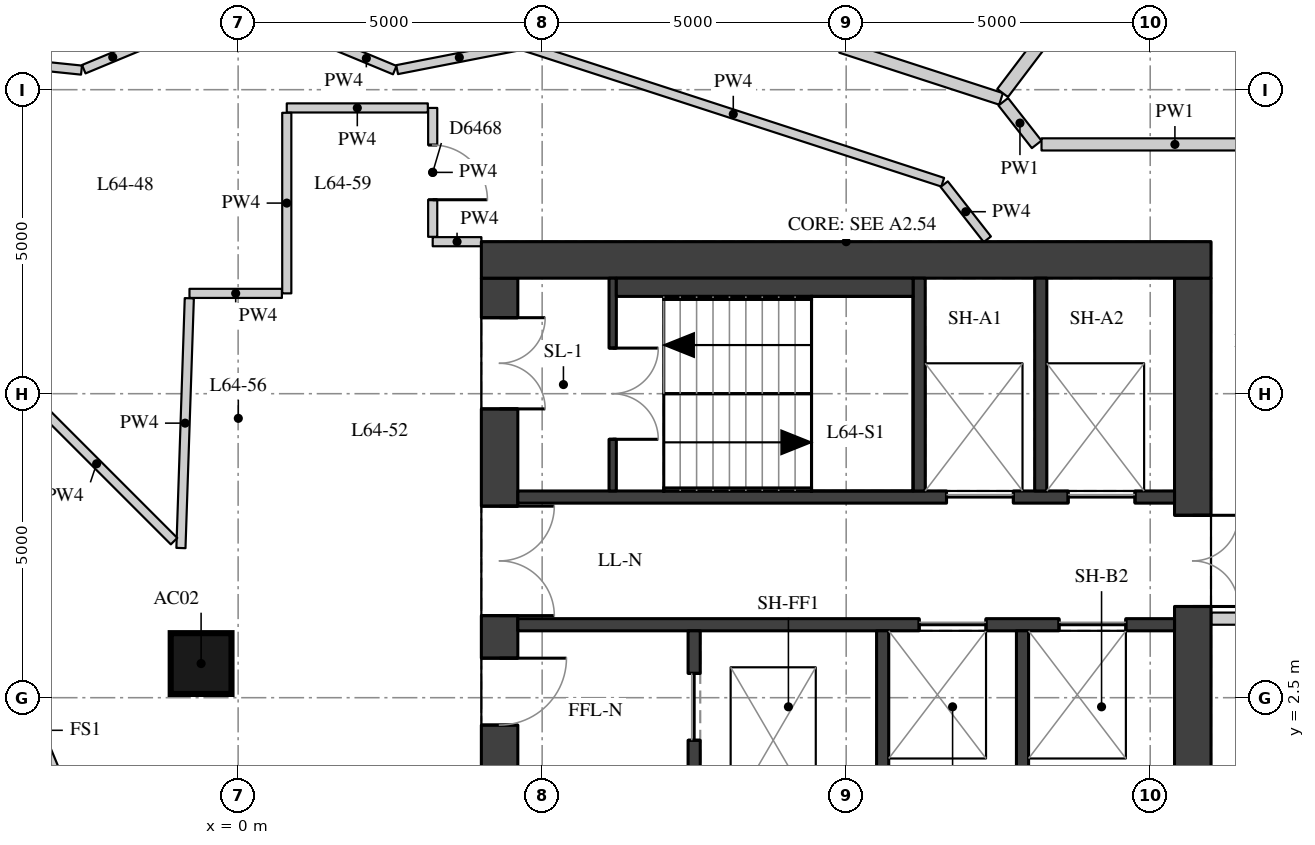
"""IFC4 building model, lengths in metres.
Left out: names, types, materials, properties, quantities, classifications, styles, units other than length and angle.
Written with IfcOpenShell. Run it as: python <this file> out.ifc"""

import sys

from ifc_helpers import new_model, si_unit, direction, frame, frame_2d, origin, origin_2d, place, context, subcontext, project, spatial, rectangle, extrude, element, fill, save


model = new_model("IFC4")
c1 = context("Model", 3, precision=1e-05, world=origin(), true_north=direction((0.0, 1.0)))
c2 = subcontext(c1, "Body", "Model", "MODEL_VIEW")
j1 = project(units=[si_unit("LENGTHUNIT", "METRE"), si_unit("PLANEANGLEUNIT", "RADIAN")], contexts=[c1])
p1 = place(None, origin())
s1 = spatial("IfcSite", under=j1, at=p1, CompositionType="ELEMENT")
p2 = place(p1, origin())
s2 = spatial("IfcBuilding", under=s1, at=p2, CompositionType="ELEMENT")
p3 = place(p2, frame((0.0, 0.0, 225.5)))
s3 = spatial("IfcBuildingStorey", under=s2, at=p3, CompositionType="ELEMENT", Elevation=225.5)
p4 = place(p3, frame((-0.609, 3.062, 0.0), z_axis=(0.0, 0.0, 1.0), x_axis=(1.0, 0.0, 0.0)))
e1 = element("IfcColumn", 1, at=p4, inside=s3, PredefinedType="COLUMN", context=c2, shape_type="SweptSolid", body=[
    extrude(rectangle(XDim=1.0, YDim=1.0, at=origin_2d()), origin(), (0.0, 0.0, 1.0), 3.3),
])
p5 = place(p3, frame((4.3, -9.4, 0.0), z_axis=(0.0, 0.0, 1.0), x_axis=(0.0, 1.0, 0.0)))
e2 = element("IfcWall", 2, at=p5, inside=s3, PredefinedType="SHEAR", context=c2, shape_type="SweptSolid", body=[
    extrude(rectangle(XDim=18.8, YDim=0.6, at=frame_2d((9.4, 0.0))), origin(), (0.0, 0.0, 1.0), 2.85),
])
p6 = place(p5, frame((0.65, 0.0, 0.0)))
e3 = element("IfcOpeningElement", 3, at=p6, cuts=e2, PredefinedType="OPENING", context=c2, shape_type="SweptSolid", body=[
    extrude(rectangle(XDim=1.5, YDim=2.1, at=frame_2d((0.75, 1.05))), frame((0.0, 0.31, 0.0), z_axis=(0.0, -1.0, 0.0), x_axis=(1.0, 0.0, 0.0)), (0.0, 0.0, 1.0), 0.62),
])
p7 = place(p5, frame((3.75, 0.0, 0.0)))
e4 = element("IfcOpeningElement", 4, at=p7, cuts=e2, PredefinedType="OPENING", context=c2, shape_type="SweptSolid", body=[
    extrude(rectangle(XDim=1.8, YDim=2.1, at=frame_2d((0.9, 1.05))), frame((0.0, 0.31, 0.0), z_axis=(0.0, -1.0, 0.0), x_axis=(1.0, 0.0, 0.0)), (0.0, 0.0, 1.0), 0.62),
])
p8 = place(p5, frame((6.25, 0.0, 0.0)))
e5 = element("IfcOpeningElement", 5, at=p8, cuts=e2, PredefinedType="OPENING", context=c2, shape_type="SweptSolid", body=[
    extrude(rectangle(XDim=1.1, YDim=2.1, at=frame_2d((0.55, 1.05))), frame((0.0, 0.31, 0.0), z_axis=(0.0, -1.0, 0.0), x_axis=(1.0, 0.0, 0.0)), (0.0, 0.0, 1.0), 0.62),
])
p9 = place(p5, frame((8.9, 0.0, 0.0)))
e6 = element("IfcOpeningElement", 6, at=p9, cuts=e2, PredefinedType="OPENING", context=c2, shape_type="SweptSolid", body=[
    extrude(rectangle(XDim=1.0, YDim=2.1, at=frame_2d((0.5, 1.05))), frame((0.0, 0.31, 0.0), z_axis=(0.0, -1.0, 0.0), x_axis=(1.0, 0.0, 0.0)), (0.0, 0.0, 1.0), 0.62),
])
p10 = place(p5, frame((11.45, 0.0, 0.0)))
e7 = element("IfcOpeningElement", 7, at=p10, cuts=e2, PredefinedType="OPENING", context=c2, shape_type="SweptSolid", body=[
    extrude(rectangle(XDim=1.1, YDim=2.1, at=frame_2d((0.55, 1.05))), frame((0.0, 0.31, 0.0), z_axis=(0.0, -1.0, 0.0), x_axis=(1.0, 0.0, 0.0)), (0.0, 0.0, 1.0), 0.62),
])
p11 = place(p5, frame((13.25, 0.0, 0.0)))
e8 = element("IfcOpeningElement", 8, at=p11, cuts=e2, PredefinedType="OPENING", context=c2, shape_type="SweptSolid", body=[
    extrude(rectangle(XDim=1.8, YDim=2.1, at=frame_2d((0.9, 1.05))), frame((0.0, 0.31, 0.0), z_axis=(0.0, -1.0, 0.0), x_axis=(1.0, 0.0, 0.0)), (0.0, 0.0, 1.0), 0.62),
])
p12 = place(p5, frame((16.65, 0.0, 0.0)))
e9 = element("IfcOpeningElement", 9, at=p12, cuts=e2, PredefinedType="OPENING", context=c2, shape_type="SweptSolid", body=[
    extrude(rectangle(XDim=1.5, YDim=2.1, at=frame_2d((0.75, 1.05))), frame((0.0, 0.31, 0.0), z_axis=(0.0, -1.0, 0.0), x_axis=(1.0, 0.0, 0.0)), (0.0, 0.0, 1.0), 0.62),
])
p13 = place(p3, frame((15.7, -9.4, 0.0), z_axis=(0.0, 0.0, 1.0), x_axis=(0.0, 1.0, 0.0)))
e10 = element("IfcWall", 10, at=p13, inside=s3, PredefinedType="SHEAR", context=c2, shape_type="SweptSolid", body=[
    extrude(rectangle(XDim=18.8, YDim=0.6, at=frame_2d((9.4, 0.0))), origin(), (0.0, 0.0, 1.0), 2.85),
])
p14 = place(p13, frame((13.4, 0.0, 0.0)))
e11 = element("IfcOpeningElement", 11, at=p14, cuts=e10, PredefinedType="OPENING", context=c2, shape_type="SweptSolid", body=[
    extrude(rectangle(XDim=1.5, YDim=2.1, at=frame_2d((0.75, 1.05))), frame((0.0, 0.31, 0.0), z_axis=(0.0, -1.0, 0.0), x_axis=(1.0, 0.0, 0.0)), (0.0, 0.0, 1.0), 0.62),
])
p15 = place(p13, frame((3.9, 0.0, 0.0)))
e12 = element("IfcOpeningElement", 12, at=p15, cuts=e10, PredefinedType="OPENING", context=c2, shape_type="SweptSolid", body=[
    extrude(rectangle(XDim=1.5, YDim=2.1, at=frame_2d((0.75, 1.05))), frame((0.0, 0.31, 0.0), z_axis=(0.0, -1.0, 0.0), x_axis=(1.0, 0.0, 0.0)), (0.0, 0.0, 1.0), 0.62),
])
p16 = place(p3, frame((4.0, 9.7, 0.0), z_axis=(0.0, 0.0, 1.0), x_axis=(1.0, 0.0, 0.0)))
e13 = element("IfcWall", 13, at=p16, inside=s3, PredefinedType="SHEAR", context=c2, shape_type="SweptSolid", body=[
    extrude(rectangle(XDim=12.0, YDim=0.6, at=frame_2d((6.0, 0.0))), origin(), (0.0, 0.0, 1.0), 2.85),
])
p17 = place(p3, frame((4.6, 5.8, 0.0), z_axis=(0.0, 0.0, 1.0), x_axis=(1.0, 0.0, 0.0)))
e14 = element("IfcWall", 14, at=p17, inside=s3, PredefinedType="SHEAR", context=c2, shape_type="SweptSolid", body=[
    extrude(rectangle(XDim=10.8, YDim=0.2, at=frame_2d((5.4, 0.0))), origin(), (0.0, 0.0, 1.0), 2.85),
])
p18 = place(p17, frame((7.05, 0.0, 0.0)))
e15 = element("IfcOpeningElement", 15, at=p18, cuts=e14, PredefinedType="OPENING", context=c2, shape_type="SweptSolid", body=[
    extrude(rectangle(XDim=1.1, YDim=2.1, at=frame_2d((0.55, 1.05))), frame((0.0, 0.11, 0.0), z_axis=(0.0, -1.0, 0.0), x_axis=(1.0, 0.0, 0.0)), (0.0, 0.0, 1.0), 0.22),
])
p19 = place(p17, frame((9.05, 0.0, 0.0)))
e16 = element("IfcOpeningElement", 16, at=p19, cuts=e14, PredefinedType="OPENING", context=c2, shape_type="SweptSolid", body=[
    extrude(rectangle(XDim=1.1, YDim=2.1, at=frame_2d((0.55, 1.05))), frame((0.0, 0.11, 0.0), z_axis=(0.0, -1.0, 0.0), x_axis=(1.0, 0.0, 0.0)), (0.0, 0.0, 1.0), 0.22),
])
p20 = place(p3, frame((4.6, 3.7, 0.0), z_axis=(0.0, 0.0, 1.0), x_axis=(1.0, 0.0, 0.0)))
e17 = element("IfcWall", 17, at=p20, inside=s3, PredefinedType="SHEAR", context=c2, shape_type="SweptSolid", body=[
    extrude(rectangle(XDim=10.8, YDim=0.2, at=frame_2d((5.4, 0.0))), origin(), (0.0, 0.0, 1.0), 2.85),
])
p21 = place(p20, frame((6.6, 0.0, 0.0)))
e18 = element("IfcOpeningElement", 18, at=p21, cuts=e17, PredefinedType="OPENING", context=c2, shape_type="SweptSolid", body=[
    extrude(rectangle(XDim=1.1, YDim=2.1, at=frame_2d((0.55, 1.05))), frame((0.0, 0.11, 0.0), z_axis=(0.0, -1.0, 0.0), x_axis=(1.0, 0.0, 0.0)), (0.0, 0.0, 1.0), 0.22),
])
p22 = place(p20, frame((8.9, 0.0, 0.0)))
e19 = element("IfcOpeningElement", 19, at=p22, cuts=e17, PredefinedType="OPENING", context=c2, shape_type="SweptSolid", body=[
    extrude(rectangle(XDim=1.1, YDim=2.1, at=frame_2d((0.55, 1.05))), frame((0.0, 0.11, 0.0), z_axis=(0.0, -1.0, 0.0), x_axis=(1.0, 0.0, 0.0)), (0.0, 0.0, 1.0), 0.22),
])
for number, where, z_axis, x_axis in (
    (20, (11.2, 5.9, 0.0), (0.0, 0.0, 1.0), (0.0, 1.0, 0.0)),
    (21, (13.2, 5.9, 0.0), (0.0, 0.0, 1.0), (0.0, 1.0, 0.0)),
):
    element("IfcWall", number, at=place(p3, frame(where, z_axis=z_axis, x_axis=x_axis)), inside=s3, PredefinedType="SHEAR", context=c2, shape_type="SweptSolid", body=[
        extrude(rectangle(XDim=3.5, YDim=0.2, at=frame_2d((1.75, 0.0))), origin(), (0.0, 0.0, 1.0), 2.85),
    ])
p23 = place(p3, frame((7.5, 1.1, 0.0), z_axis=(0.0, 0.0, 1.0), x_axis=(0.0, 1.0, 0.0)))
e22 = element("IfcWall", 22, at=p23, inside=s3, PredefinedType="SHEAR", context=c2, shape_type="SweptSolid", body=[
    extrude(rectangle(XDim=2.5, YDim=0.2, at=frame_2d((1.25, 0.0))), origin(), (0.0, 0.0, 1.0), 2.85),
])
p24 = place(p23, frame((0.7, 0.0, 0.0)))
e23 = element("IfcOpeningElement", 23, at=p24, cuts=e22, PredefinedType="OPENING", context=c2, shape_type="SweptSolid", body=[
    extrude(rectangle(XDim=1.1, YDim=2.1, at=frame_2d((0.55, 1.05))), frame((0.0, 0.11, 0.0), z_axis=(0.0, -1.0, 0.0), x_axis=(1.0, 0.0, 0.0)), (0.0, 0.0, 1.0), 0.22),
])
for number, where, z_axis, x_axis in (
    (24, (10.6, 1.1, 0.0), (0.0, 0.0, 1.0), (0.0, 1.0, 0.0)),
    (25, (12.9, 1.1, 0.0), (0.0, 0.0, 1.0), (0.0, 1.0, 0.0)),
):
    element("IfcWall", number, at=place(p3, frame(where, z_axis=z_axis, x_axis=x_axis)), inside=s3, PredefinedType="SHEAR", context=c2, shape_type="SweptSolid", body=[
        extrude(rectangle(XDim=2.5, YDim=0.2, at=frame_2d((1.25, 0.0))), origin(), (0.0, 0.0, 1.0), 2.85),
    ])
p25 = place(p3, frame((6.16, 5.9, 0.0), z_axis=(0.0, 0.0, 1.0), x_axis=(0.0, 1.0, 0.0)))
e26 = element("IfcWall", 26, at=p25, inside=s3, PredefinedType="SHEAR", context=c2, shape_type="SweptSolid", body=[
    extrude(rectangle(XDim=3.5, YDim=0.12, at=frame_2d((1.75, 0.0))), origin(), (0.0, 0.0, 1.0), 2.85),
])
p26 = place(p25, frame((0.85, 0.0, 0.0)))
e27 = element("IfcOpeningElement", 27, at=p26, cuts=e26, PredefinedType="OPENING", context=c2, shape_type="SweptSolid", body=[
    extrude(rectangle(XDim=1.5, YDim=2.1, at=frame_2d((0.75, 1.05))), frame((0.0, 0.07, 0.0), z_axis=(0.0, -1.0, 0.0), x_axis=(1.0, 0.0, 0.0)), (0.0, 0.0, 1.0), 0.14),
])
p27 = place(p3, frame((6.22, 9.25, 0.0), z_axis=(0.0, 0.0, 1.0), x_axis=(1.0, 0.0, 0.0)))
e28 = element("IfcWall", 28, at=p27, inside=s3, PredefinedType="PARTITIONING", context=c2, shape_type="SweptSolid", body=[
    extrude(rectangle(XDim=4.88, YDim=0.3, at=frame_2d((2.44, 0.0))), origin(), (0.0, 0.0, 1.0), 2.85),
])
p28 = place(p3, frame((0.795, 16.169, 0.0), z_axis=(0.0, 0.0, 1.0), x_axis=(0.950998491074, -0.309195520626, 0.0)))
e29 = element("IfcWall", 29, at=p28, inside=s3, PredefinedType="PARTITIONING", context=c2, shape_type="SweptSolid", body=[
    extrude(rectangle(XDim=12.357, YDim=0.2, at=frame_2d((6.179, 0.0))), origin(), (0.0, 0.0, 1.0), 2.85),
])
p29 = place(p28, frame((8.496, 0.0, 0.0)))
e30 = element("IfcOpeningElement", 30, at=p29, cuts=e29, PredefinedType="OPENING", context=c2, shape_type="SweptSolid", body=[
    extrude(rectangle(XDim=1.1, YDim=2.1, at=frame_2d((0.55, 1.05))), frame((0.0, 0.11, 0.0), z_axis=(0.0, -1.0, 0.0), x_axis=(1.0, 0.0, 0.0)), (0.0, 0.0, 1.0), 0.22),
])
p30 = place(p28, frame((4.169, 0.0, 0.0)))
e31 = element("IfcOpeningElement", 31, at=p30, cuts=e29, PredefinedType="OPENING", context=c2, shape_type="SweptSolid", body=[
    extrude(rectangle(XDim=0.9, YDim=2.1, at=frame_2d((0.45, 1.05))), frame((0.0, 0.11, 0.0), z_axis=(0.0, -1.0, 0.0), x_axis=(1.0, 0.0, 0.0)), (0.0, 0.0, 1.0), 0.22),
])
p31 = place(p28, frame((0.747, 0.0, 0.0)))
e32 = element("IfcOpeningElement", 32, at=p31, cuts=e29, PredefinedType="OPENING", context=c2, shape_type="SweptSolid", body=[
    extrude(rectangle(XDim=0.9, YDim=2.1, at=frame_2d((0.45, 1.05))), frame((0.0, 0.11, 0.0), z_axis=(0.0, -1.0, 0.0), x_axis=(1.0, 0.0, 0.0)), (0.0, 0.0, 1.0), 0.22),
])
p32 = place(p3, frame((12.583, 12.301, 0.0), z_axis=(0.0, 0.0, 1.0), x_axis=(0.616670471626, -0.787221397972, 0.0)))
e33 = element("IfcWall", 33, at=p32, inside=s3, PredefinedType="PARTITIONING", context=c2, shape_type="SweptSolid", body=[
    extrude(rectangle(XDim=0.89, YDim=0.2, at=frame_2d((0.445, 0.0))), origin(), (0.0, 0.0, 1.0), 2.85),
])
p33 = place(p3, frame((13.213, 11.6, 0.0), z_axis=(0.0, 0.0, 1.0), x_axis=(1.0, 0.0, 0.0)))
e34 = element("IfcWall", 34, at=p33, inside=s3, PredefinedType="PARTITIONING", context=c2, shape_type="SweptSolid", body=[
    extrude(rectangle(XDim=4.387, YDim=0.2, at=frame_2d((2.194, 0.0))), origin(), (0.0, 0.0, 1.0), 2.85),
])
p34 = place(p3, frame((17.6, 3.8, 0.0), z_axis=(0.0, 0.0, 1.0), x_axis=(-1.0, 0.0, 0.0)))
e35 = element("IfcWall", 35, at=p34, inside=s3, PredefinedType="PARTITIONING", context=c2, shape_type="SweptSolid", body=[
    extrude(rectangle(XDim=1.596, YDim=0.2, at=frame_2d((0.798, 0.0))), origin(), (0.0, 0.0, 1.0), 2.85),
])
p35 = place(p3, frame((4.001, 10.0, 0.0), z_axis=(0.0, 0.0, 1.0), x_axis=(-1.0, 0.0, 0.0)))
e36 = element("IfcWall", 36, at=p35, inside=s3, PredefinedType="PARTITIONING", context=c2, shape_type="SweptSolid", body=[
    extrude(rectangle(XDim=0.801, YDim=0.15, at=frame_2d((0.4, 0.0))), origin(), (0.0, 0.0, 1.0), 2.85),
])
p36 = place(p3, frame((3.2, 10.08, 0.0), z_axis=(0.0, 0.0, 1.0), x_axis=(0.0, 1.0, 0.0)))
e37 = element("IfcWall", 37, at=p36, inside=s3, PredefinedType="PARTITIONING", context=c2, shape_type="SweptSolid", body=[
    extrude(rectangle(XDim=2.12, YDim=0.15, at=frame_2d((1.06, 0.0))), origin(), (0.0, 0.0, 1.0), 2.85),
])
p37 = place(p36, frame((0.61, 0.0, 0.0)))
e38 = element("IfcOpeningElement", 38, at=p37, cuts=e37, PredefinedType="OPENING", context=c2, shape_type="SweptSolid", body=[
    extrude(rectangle(XDim=0.9, YDim=2.1, at=frame_2d((0.45, 1.05))), frame((0.0, 0.085, 0.0), z_axis=(0.0, -1.0, 0.0), x_axis=(1.0, 0.0, 0.0)), (0.0, 0.0, 1.0), 0.17),
])
p38 = place(p3, frame((3.12, 12.2, 0.0), z_axis=(0.0, 0.0, 1.0), x_axis=(-1.0, 0.0, 0.0)))
e39 = element("IfcWall", 39, at=p38, inside=s3, PredefinedType="PARTITIONING", context=c2, shape_type="SweptSolid", body=[
    extrude(rectangle(XDim=2.32, YDim=0.15, at=frame_2d((1.16, 0.0))), origin(), (0.0, 0.0, 1.0), 2.85),
])
p39 = place(p3, frame((0.8, 12.12, 0.0), z_axis=(0.0, 0.0, 1.0), x_axis=(0.0, -1.0, 0.0)))
e40 = element("IfcWall", 40, at=p39, inside=s3, PredefinedType="PARTITIONING", context=c2, shape_type="SweptSolid", body=[
    extrude(rectangle(XDim=2.97, YDim=0.15, at=frame_2d((1.485, 0.0))), origin(), (0.0, 0.0, 1.0), 2.85),
])
p40 = place(p3, frame((0.72, 9.15, 0.0), z_axis=(0.0, 0.0, 1.0), x_axis=(-1.0, 0.0, 0.0)))
e41 = element("IfcWall", 41, at=p40, inside=s3, PredefinedType="PARTITIONING", context=c2, shape_type="SweptSolid", body=[
    extrude(rectangle(XDim=1.52, YDim=0.15, at=frame_2d((0.76, 0.0))), origin(), (0.0, 0.0, 1.0), 2.85),
])
p41 = place(p3, frame((-0.803, 9.07, 0.0), z_axis=(0.0, 0.0, 1.0), x_axis=(-0.033496761224, -0.999438826036, 0.0)))
e42 = element("IfcWall", 42, at=p41, inside=s3, PredefinedType="PARTITIONING", context=c2, shape_type="SweptSolid", body=[
    extrude(rectangle(XDim=4.111, YDim=0.15, at=frame_2d((2.055, 0.0))), origin(), (0.0, 0.0, 1.0), 2.85),
])
p42 = place(p3, frame((-1.054, 5.075, 0.0), z_axis=(0.0, 0.0, 1.0), x_axis=(-0.707106781187, 0.707106781187, 0.0)))
e43 = element("IfcWall", 43, at=p42, inside=s3, PredefinedType="PARTITIONING", context=c2, shape_type="SweptSolid", body=[
    extrude(rectangle(XDim=3.601, YDim=0.15, at=frame_2d((1.8, 0.0))), origin(), (0.0, 0.0, 1.0), 2.85),
])
p43 = place(p3, frame((-5.229, 13.095, 0.0), z_axis=(0.0, 0.0, 1.0), x_axis=(0.994729851422, -0.102530593925, 0.0)))
e44 = element("IfcWall", 44, at=p43, inside=s3, PredefinedType="PARTITIONING", context=c2, shape_type="SweptSolid", body=[
    extrude(rectangle(XDim=2.667, YDim=0.15, at=frame_2d((1.333, 0.0))), origin(), (0.0, 0.0, 1.0), 2.85),
])
p44 = place(p3, frame((-2.539, 12.837, 0.0), z_axis=(0.0, 0.0, 1.0), x_axis=(0.923768662954, 0.382950985565, 0.0)))
e45 = element("IfcWall", 45, at=p44, inside=s3, PredefinedType="PARTITIONING", context=c2, shape_type="SweptSolid", body=[
    extrude(rectangle(XDim=1.031, YDim=0.15, at=frame_2d((0.516, 0.0))), origin(), (0.0, 0.0, 1.0), 2.85),
])
p45 = place(p3, frame((1.641, 13.209, 0.0), z_axis=(0.0, 0.0, 1.0), x_axis=(0.923725449546, -0.383055209937, 0.0)))
e46 = element("IfcWall", 46, at=p45, inside=s3, PredefinedType="PARTITIONING", context=c2, shape_type="SweptSolid", body=[
    extrude(rectangle(XDim=1.011, YDim=0.15, at=frame_2d((0.506, 0.0))), origin(), (0.0, 0.0, 1.0), 2.85),
])
p46 = place(p3, frame((2.615, 12.83, 0.0), z_axis=(0.0, 0.0, 1.0), x_axis=(0.98140512634, 0.191947852276, 0.0)))
e47 = element("IfcWall", 47, at=p46, inside=s3, PredefinedType="PARTITIONING", context=c2, shape_type="SweptSolid", body=[
    extrude(rectangle(XDim=2.085, YDim=0.15, at=frame_2d((1.042, 0.0))), origin(), (0.0, 0.0, 1.0), 2.85),
])
p47 = place(p3, frame((4.699, 13.218, 0.0), z_axis=(0.0, 0.0, 1.0), x_axis=(0.95099963578, -0.30919199981, 0.0)))
e48 = element("IfcWall", 48, at=p47, inside=s3, PredefinedType="PARTITIONING", context=c2, shape_type="SweptSolid", body=[
    extrude(rectangle(XDim=7.244, YDim=0.15, at=frame_2d((3.622, 0.0))), origin(), (0.0, 0.0, 1.0), 2.85),
])
p48 = place(p3, frame((11.612, 10.946, 0.0), z_axis=(0.0, 0.0, 1.0), x_axis=(0.616228210046, -0.787567643535, 0.0)))
e49 = element("IfcWall", 49, at=p48, inside=s3, PredefinedType="PARTITIONING", context=c2, shape_type="SweptSolid", body=[
    extrude(rectangle(XDim=1.151, YDim=0.15, at=frame_2d((0.576, 0.0))), origin(), (0.0, 0.0, 1.0), 2.85),
])
p49 = place(p3, frame((16.863, 18.113, 0.0), z_axis=(0.0, 0.0, 1.0), x_axis=(-0.603604387564, -0.79728397909, 0.0)))
e50 = element("IfcWall", 50, at=p49, inside=s3, PredefinedType="PARTITIONING", context=c2, shape_type="SweptSolid", body=[
    extrude(rectangle(XDim=7.108, YDim=0.22, at=frame_2d((3.554, 0.0))), origin(), (0.0, 0.0, 1.0), 2.85),
])
p50 = place(p3, frame((-4.073, 3.927, 0.0), z_axis=(0.0, 0.0, 1.0), x_axis=(0.382730523909, -0.923860025149, 0.0)))
e51 = element("IfcWall", 51, at=p50, inside=s3, PredefinedType="PARTITIONING", context=c2, shape_type="SweptSolid", body=[
    extrude(rectangle(XDim=4.251, YDim=0.1, at=frame_2d((2.125, 0.0))), origin(), (0.0, 0.0, 1.0), 2.85),
])
p51 = place(p10, origin())
e52 = element("IfcDoor", 52, at=p51, inside=s3, OperationType="SINGLE_SWING_LEFT", PredefinedType="DOOR", context=c2, shape_type="SweptSolid", body=[
    extrude(rectangle(XDim=1.1, YDim=2.1, at=frame_2d((0.55, 1.05))), frame((0.0, 0.025, 0.0), z_axis=(0.0, -1.0, 0.0), x_axis=(1.0, 0.0, 0.0)), (0.0, 0.0, 1.0), 0.05),
])
fill(e7, e52)
p52 = place(p11, origin())
e53 = element("IfcDoor", 53, at=p52, inside=s3, OperationType="DOUBLE_DOOR_SINGLE_SWING", PredefinedType="DOOR", context=c2, shape_type="SweptSolid", body=[
    extrude(rectangle(XDim=1.8, YDim=2.1, at=frame_2d((0.9, 1.05))), frame((0.0, 0.025, 0.0), z_axis=(0.0, -1.0, 0.0), x_axis=(1.0, 0.0, 0.0)), (0.0, 0.0, 1.0), 0.05),
])
fill(e8, e53)
p53 = place(p12, origin())
e54 = element("IfcDoor", 54, at=p53, inside=s3, OperationType="DOUBLE_DOOR_SINGLE_SWING", PredefinedType="DOOR", context=c2, shape_type="SweptSolid", body=[
    extrude(rectangle(XDim=1.5, YDim=2.1, at=frame_2d((0.75, 1.05))), frame((0.0, 0.025, 0.0), z_axis=(0.0, -1.0, 0.0), x_axis=(1.0, 0.0, 0.0)), (0.0, 0.0, 1.0), 0.05),
])
fill(e9, e54)
p54 = place(p14, origin())
e55 = element("IfcDoor", 55, at=p54, inside=s3, OperationType="DOUBLE_DOOR_SINGLE_SWING", PredefinedType="DOOR", context=c2, shape_type="SweptSolid", body=[
    extrude(rectangle(XDim=1.5, YDim=2.1, at=frame_2d((0.75, 1.05))), frame((0.0, 0.025, 0.0), z_axis=(0.0, -1.0, 0.0), x_axis=(1.0, 0.0, 0.0)), (0.0, 0.0, 1.0), 0.05),
])
fill(e11, e55)
p55 = place(p26, origin())
e56 = element("IfcDoor", 56, at=p55, inside=s3, OperationType="DOUBLE_DOOR_SINGLE_SWING", PredefinedType="DOOR", context=c2, shape_type="SweptSolid", body=[
    extrude(rectangle(XDim=1.5, YDim=2.1, at=frame_2d((0.75, 1.05))), frame((0.0, 0.025, 0.0), z_axis=(0.0, -1.0, 0.0), x_axis=(1.0, 0.0, 0.0)), (0.0, 0.0, 1.0), 0.05),
])
fill(e27, e56)
p56 = place(p18, origin())
e57 = element("IfcDoor", 57, at=p56, inside=s3, OperationType="DOUBLE_DOOR_SLIDING", PredefinedType="DOOR", context=c2, shape_type="SweptSolid", body=[
    extrude(rectangle(XDim=1.1, YDim=2.1, at=frame_2d((0.55, 1.05))), frame((0.0, 0.025, 0.0), z_axis=(0.0, -1.0, 0.0), x_axis=(1.0, 0.0, 0.0)), (0.0, 0.0, 1.0), 0.05),
])
fill(e15, e57)
p57 = place(p19, origin())
e58 = element("IfcDoor", 58, at=p57, inside=s3, OperationType="DOUBLE_DOOR_SLIDING", PredefinedType="DOOR", context=c2, shape_type="SweptSolid", body=[
    extrude(rectangle(XDim=1.1, YDim=2.1, at=frame_2d((0.55, 1.05))), frame((0.0, 0.025, 0.0), z_axis=(0.0, -1.0, 0.0), x_axis=(1.0, 0.0, 0.0)), (0.0, 0.0, 1.0), 0.05),
])
fill(e16, e58)
p58 = place(p21, origin())
e59 = element("IfcDoor", 59, at=p58, inside=s3, OperationType="DOUBLE_DOOR_SLIDING", PredefinedType="DOOR", context=c2, shape_type="SweptSolid", body=[
    extrude(rectangle(XDim=1.1, YDim=2.1, at=frame_2d((0.55, 1.05))), frame((0.0, 0.025, 0.0), z_axis=(0.0, -1.0, 0.0), x_axis=(1.0, 0.0, 0.0)), (0.0, 0.0, 1.0), 0.05),
])
fill(e18, e59)
p59 = place(p22, origin())
e60 = element("IfcDoor", 60, at=p59, inside=s3, OperationType="DOUBLE_DOOR_SLIDING", PredefinedType="DOOR", context=c2, shape_type="SweptSolid", body=[
    extrude(rectangle(XDim=1.1, YDim=2.1, at=frame_2d((0.55, 1.05))), frame((0.0, 0.025, 0.0), z_axis=(0.0, -1.0, 0.0), x_axis=(1.0, 0.0, 0.0)), (0.0, 0.0, 1.0), 0.05),
])
fill(e19, e60)
p60 = place(p24, origin())
e61 = element("IfcDoor", 61, at=p60, inside=s3, OperationType="DOUBLE_DOOR_SLIDING", PredefinedType="DOOR", context=c2, shape_type="SweptSolid", body=[
    extrude(rectangle(XDim=1.1, YDim=2.1, at=frame_2d((0.55, 1.05))), frame((0.0, 0.025, 0.0), z_axis=(0.0, -1.0, 0.0), x_axis=(1.0, 0.0, 0.0)), (0.0, 0.0, 1.0), 0.05),
])
fill(e23, e61)
p61 = place(p37, origin())
e62 = element("IfcDoor", 62, at=p61, inside=s3, OperationType="SINGLE_SWING_RIGHT", PredefinedType="DOOR", context=c2, shape_type="SweptSolid", body=[
    extrude(rectangle(XDim=0.9, YDim=2.1, at=frame_2d((0.45, 1.05))), frame((0.0, 0.025, 0.0), z_axis=(0.0, -1.0, 0.0), x_axis=(1.0, 0.0, 0.0)), (0.0, 0.0, 1.0), 0.05),
])
fill(e38, e62)
save(model, sys.argv[1])
